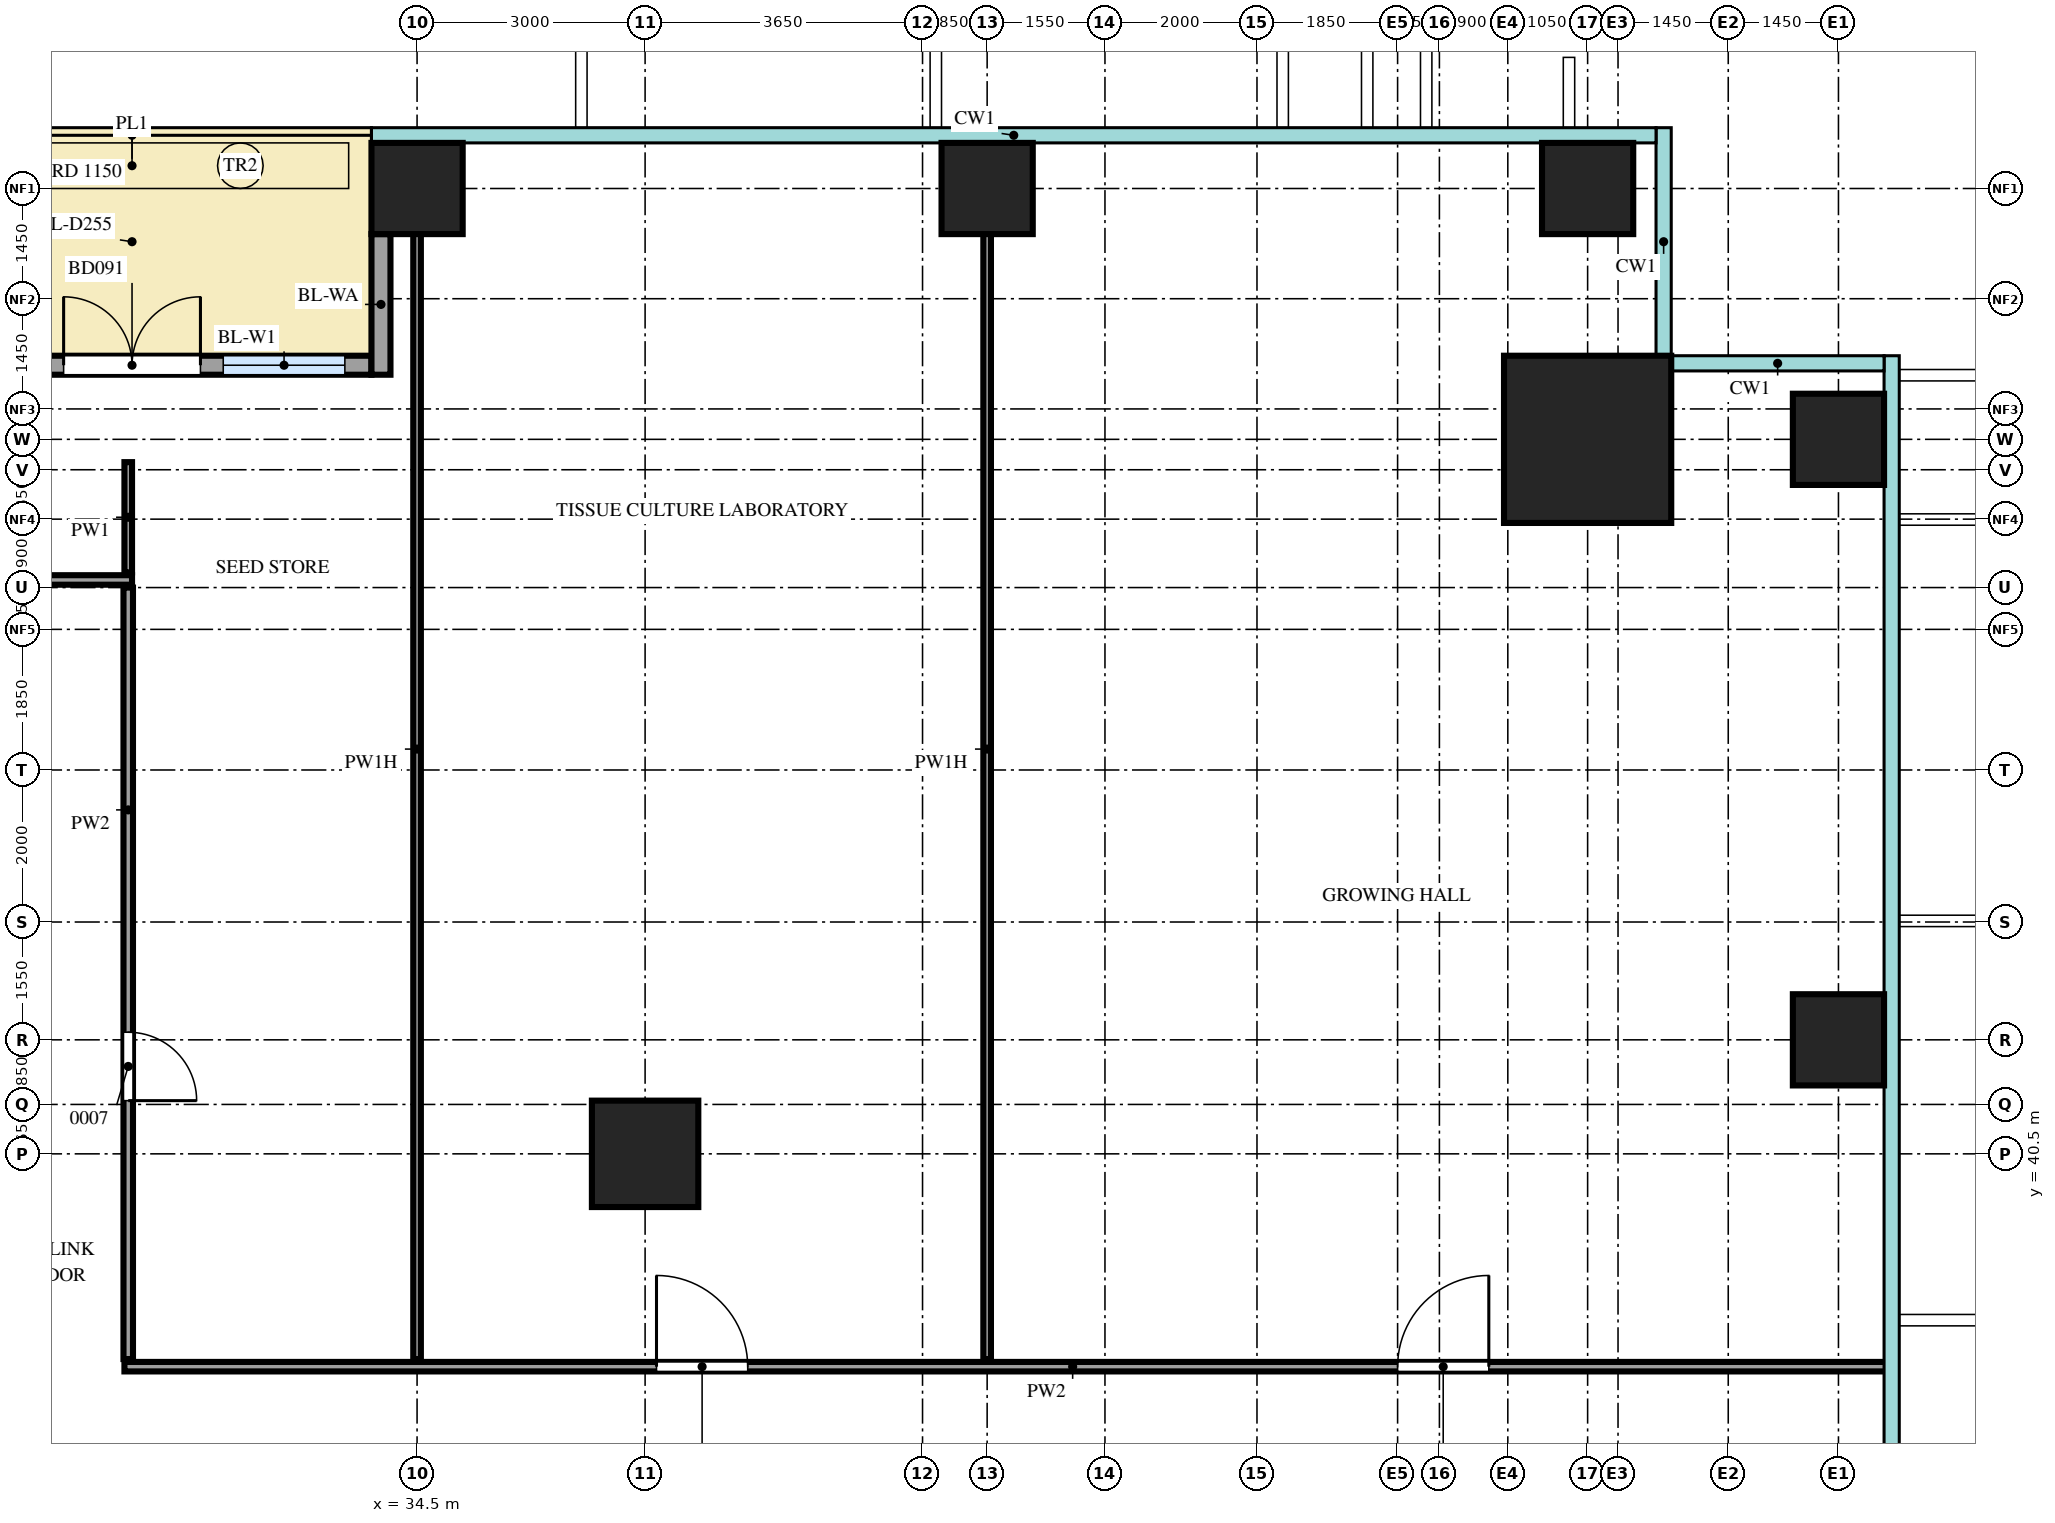
"""IFC4 building model, lengths in metres.
Left out: names, types, materials, properties, quantities, classifications, styles, units other than length and angle.
Written with IfcOpenShell. Run it as: python <this file> out.ifc"""

import sys

from ifc_helpers import new_model, si_unit, direction, frame, frame_2d, origin, origin_2d, place, context, subcontext, project, spatial, rectangle, extrude, source, transform, mapped, element, fill, save


model = new_model("IFC4")
c1 = context("Model", 3, precision=1e-05, world=origin(), true_north=direction((0.0, 1.0)))
c2 = subcontext(c1, "Body", "Model", "MODEL_VIEW")
j1 = project(units=[si_unit("LENGTHUNIT", "METRE"), si_unit("PLANEANGLEUNIT", "RADIAN")], contexts=[c1])
p1 = place(None, origin())
s1 = spatial("IfcSite", under=j1, at=p1, CompositionType="ELEMENT")
p2 = place(p1, origin())
s2 = spatial("IfcBuilding", under=s1, at=p2, CompositionType="ELEMENT")
p3 = place(p2, frame((0.0, 0.0, 46.5)))
s3 = spatial("IfcBuildingStorey", under=s2, at=p3, CompositionType="ELEMENT", Elevation=46.5)
m1 = source(origin(), c2, "Body", "SweptSolid", [
    extrude(rectangle(XDim=2.2, YDim=2.2, at=origin_2d()), origin(), (0.0, 0.0, 1.0), 4.5),
])
p4 = place(p3, frame((49.9, 49.9, 0.0), z_axis=(0.0, 0.0, 1.0), x_axis=(1.0, 0.0, 0.0)))
e1 = element("IfcColumn", 1, at=p4, inside=s3, PredefinedType="COLUMN", context=c2, shape_type="MappedRepresentation", body=[
    mapped(m1, transform((0.0, 0.0, 0.0))),
])
m2 = source(origin(), c2, "Body", "SweptSolid", [
    extrude(rectangle(XDim=1.2, YDim=1.2, at=origin_2d()), origin(), (0.0, 0.0, 1.0), 4.2),
])
for number, where, z_axis, x_axis in (
    (2, (53.2, 42.0, 0.0), (0.0, 0.0, 1.0), (1.0, 0.0, 0.0)),
    (3, (53.2, 49.9, 0.0), (0.0, 0.0, 1.0), (1.0, 0.0, 0.0)),
    (4, (34.5, 53.2, 0.0), (0.0, 0.0, 1.0), (1.0, 0.0, 0.0)),
    (5, (42.0, 53.2, 0.0), (0.0, 0.0, 1.0), (1.0, 0.0, 0.0)),
    (6, (49.9, 53.2, 0.0), (0.0, 0.0, 1.0), (1.0, 0.0, 0.0)),
):
    element("IfcColumn", number, at=place(p3, frame(where, z_axis=z_axis, x_axis=x_axis)), inside=s3, PredefinedType="COLUMN", context=c2, shape_type="MappedRepresentation", body=[
        mapped(m2, transform((0.0, 0.0, 0.0))),
    ])
m3 = source(origin(), c2, "Body", "SweptSolid", [
    extrude(rectangle(XDim=1.4, YDim=1.4, at=origin_2d()), origin(), (0.0, 0.0, 1.0), 4.2),
])
p5 = place(p3, frame((37.5, 40.5, 0.0), z_axis=(0.0, 0.0, 1.0), x_axis=(1.0, 0.0, 0.0)))
e7 = element("IfcColumn", 7, at=p5, inside=s3, PredefinedType="COLUMN", context=c2, shape_type="MappedRepresentation", body=[
    mapped(m3, transform((0.0, 0.0, 0.0))),
])
m4 = source(origin(), c2, "Body", "SweptSolid", [
    extrude(rectangle(XDim=6.3, YDim=0.25, at=frame_2d((3.15, 0.0))), origin(), (0.0, 0.0, 1.0), 4.2),
])
p6 = place(p3, frame((27.6, 50.875, 0.0), z_axis=(0.0, 0.0, 1.0), x_axis=(1.0, 0.0, 0.0)))
e8 = element("IfcWall", 8, at=p6, inside=s3, PredefinedType="SOLIDWALL", context=c2, shape_type="MappedRepresentation", body=[
    mapped(m4, transform((0.0, 0.0, 0.0))),
])
m5 = source(origin(), c2, "Body", "SweptSolid", [
    extrude(rectangle(XDim=1.6, YDim=2.4, at=frame_2d((0.8, 1.2))), frame((0.0, 0.135, 0.0), z_axis=(0.0, -1.0, 0.0), x_axis=(1.0, 0.0, 0.0)), (0.0, 0.0, 1.0), 0.27),
])
p7 = place(p6, frame((0.35, 0.0, 0.0)))
e9 = element("IfcOpeningElement", 9, at=p7, cuts=e8, PredefinedType="OPENING", context=c2, shape_type="MappedRepresentation", body=[
    mapped(m5, transform((0.0, 0.0, 0.0))),
])
p8 = place(p6, frame((4.35, 0.0, 0.0)))
e10 = element("IfcOpeningElement", 10, at=p8, cuts=e8, PredefinedType="OPENING", context=c2, shape_type="MappedRepresentation", body=[
    mapped(m5, transform((0.0, 0.0, 0.0))),
])
m6 = source(origin(), c2, "Body", "SweptSolid", [
    extrude(rectangle(XDim=1.8, YDim=2.4, at=frame_2d((0.9, 1.2))), frame((0.0, 0.135, 0.0), z_axis=(0.0, -1.0, 0.0), x_axis=(1.0, 0.0, 0.0)), (0.0, 0.0, 1.0), 0.27),
])
p9 = place(p6, frame((2.25, 0.0, 0.0)))
e11 = element("IfcOpeningElement", 11, at=p9, cuts=e8, PredefinedType="OPENING", context=c2, shape_type="MappedRepresentation", body=[
    mapped(m6, transform((0.0, 0.0, 0.0))),
])
m7 = source(origin(), c2, "Body", "SweptSolid", [
    extrude(rectangle(XDim=1.85, YDim=0.25, at=frame_2d((0.925, 0.0))), origin(), (0.0, 0.0, 1.0), 3.9),
])
p10 = place(p3, frame((34.025, 52.6, 0.0), z_axis=(0.0, 0.0, 1.0), x_axis=(0.0, -1.0, 0.0)))
e12 = element("IfcWall", 12, at=p10, inside=s3, PredefinedType="SOLIDWALL", context=c2, shape_type="MappedRepresentation", body=[
    mapped(m7, transform((0.0, 0.0, 0.0))),
])
m8 = source(origin(), c2, "Body", "SweptSolid", [
    extrude(rectangle(XDim=23.2, YDim=0.125, at=frame_2d((11.6, 0.0))), origin(), (0.0, 0.0, 1.0), 4.3),
])
p11 = place(p3, frame((30.65, 37.7, 0.0), z_axis=(0.0, 0.0, 1.0), x_axis=(1.0, 0.0, 0.0)))
e13 = element("IfcWall", 13, at=p11, inside=s3, PredefinedType="PARTITIONING", context=c2, shape_type="MappedRepresentation", body=[
    mapped(m8, transform((0.0, 0.0, 0.0))),
])
m9 = source(origin(), c2, "Body", "SweptSolid", [
    extrude(rectangle(XDim=1.2, YDim=2.1, at=frame_2d((0.6, 1.05))), frame((0.0, 0.073, 0.0), z_axis=(0.0, -1.0, 0.0), x_axis=(1.0, 0.0, 0.0)), (0.0, 0.0, 1.0), 0.145),
])
p12 = place(p11, frame((7.0, 0.0, 0.0)))
e14 = element("IfcOpeningElement", 14, at=p12, cuts=e13, PredefinedType="OPENING", context=c2, shape_type="MappedRepresentation", body=[
    mapped(m9, transform((0.0, 0.0, 0.0))),
])
p13 = place(p11, frame((16.75, 0.0, 0.0)))
e15 = element("IfcOpeningElement", 15, at=p13, cuts=e13, PredefinedType="OPENING", context=c2, shape_type="MappedRepresentation", body=[
    mapped(m9, transform((0.0, 0.0, 0.0))),
])
m10 = source(origin(), c2, "Body", "SweptSolid", [
    extrude(rectangle(XDim=10.15, YDim=0.125, at=frame_2d((5.075, 0.0))), origin(), (0.0, 0.0, 1.0), 4.3),
])
p14 = place(p3, frame((30.7, 37.8, 0.0), z_axis=(0.0, 0.0, 1.0), x_axis=(0.0, 1.0, 0.0)))
e16 = element("IfcWall", 16, at=p14, inside=s3, PredefinedType="PARTITIONING", context=c2, shape_type="MappedRepresentation", body=[
    mapped(m10, transform((0.0, 0.0, 0.0))),
])
m11 = source(origin(), c2, "Body", "SweptSolid", [
    extrude(rectangle(XDim=0.9, YDim=2.1, at=frame_2d((0.45, 1.05))), frame((0.0, 0.073, 0.0), z_axis=(0.0, -1.0, 0.0), x_axis=(1.0, 0.0, 0.0)), (0.0, 0.0, 1.0), 0.145),
])
p15 = place(p14, frame((3.4, 0.0, 0.0)))
e17 = element("IfcOpeningElement", 17, at=p15, cuts=e16, PredefinedType="OPENING", context=c2, shape_type="MappedRepresentation", body=[
    mapped(m11, transform((0.0, 0.0, 0.0))),
])
m12 = source(origin(), c2, "Body", "SweptSolid", [
    extrude(rectangle(XDim=16.05, YDim=0.1, at=frame_2d((8.025, 0.0))), origin(), (0.0, 0.0, 1.0), 3.7),
])
for number, where, z_axis, x_axis in (
    (18, (34.5, 37.8, 0.0), (0.0, 0.0, 1.0), (0.0, 1.0, 0.0)),
    (19, (42.0, 37.8, 0.0), (0.0, 0.0, 1.0), (0.0, 1.0, 0.0)),
):
    element("IfcWall", number, at=place(p3, frame(where, z_axis=z_axis, x_axis=x_axis)), inside=s3, PredefinedType="PARTITIONING", context=c2, shape_type="MappedRepresentation", body=[
        mapped(m12, transform((0.0, 0.0, 0.0))),
    ])
m13 = source(origin(), c2, "Body", "SweptSolid", [
    extrude(rectangle(XDim=26.6, YDim=0.125, at=frame_2d((13.3, 0.0))), origin(), (0.0, 0.0, 1.0), 4.3),
])
p16 = place(p3, frame((4.15, 48.05, 0.0), z_axis=(0.0, 0.0, 1.0), x_axis=(1.0, 0.0, 0.0)))
e20 = element("IfcWall", 20, at=p16, inside=s3, PredefinedType="PARTITIONING", context=c2, shape_type="MappedRepresentation", body=[
    mapped(m13, transform((0.0, 0.0, 0.0))),
])
p17 = place(p16, frame((3.5, 0.0, 0.0)))
e21 = element("IfcOpeningElement", 21, at=p17, cuts=e20, PredefinedType="OPENING", context=c2, shape_type="MappedRepresentation", body=[
    mapped(m11, transform((0.0, 0.0, 0.0))),
])
p18 = place(p16, frame((16.6, 0.0, 0.0)))
e22 = element("IfcOpeningElement", 22, at=p18, cuts=e20, PredefinedType="OPENING", context=c2, shape_type="MappedRepresentation", body=[
    mapped(m9, transform((0.0, 0.0, 0.0))),
])
m14 = source(origin(), c2, "Body", "SweptSolid", [
    extrude(rectangle(XDim=1.45, YDim=0.1, at=frame_2d((0.725, 0.0))), origin(), (0.0, 0.0, 1.0), 4.3),
])
p19 = place(p3, frame((30.7, 48.15, 0.0), z_axis=(0.0, 0.0, 1.0), x_axis=(0.0, 1.0, 0.0)))
e23 = element("IfcWall", 23, at=p19, inside=s3, PredefinedType="PARTITIONING", context=c2, shape_type="MappedRepresentation", body=[
    mapped(m14, transform((0.0, 0.0, 0.0))),
])
m15 = source(origin(), c2, "Body", "SweptSolid", [
    extrude(rectangle(XDim=1.6, YDim=2.4, at=frame_2d((0.8, 1.2))), frame((0.0, 0.03, 0.0), z_axis=(0.0, -1.0, 0.0), x_axis=(1.0, 0.0, 0.0)), (0.0, 0.0, 1.0), 0.06),
])
p20 = place(p8, origin())
e24 = element("IfcWindow", 24, at=p20, inside=s3, PartitioningType="SINGLE_PANEL", PredefinedType="WINDOW", context=c2, shape_type="MappedRepresentation", body=[
    mapped(m15, transform((0.0, 0.0, 0.0))),
])
fill(e10, e24)
m16 = source(origin(), c2, "Body", "SweptSolid", [
    extrude(rectangle(XDim=1.8, YDim=2.4, at=frame_2d((0.9, 1.2))), frame((0.0, 0.025, 0.0), z_axis=(0.0, -1.0, 0.0), x_axis=(1.0, 0.0, 0.0)), (0.0, 0.0, 1.0), 0.05),
])
p21 = place(p9, origin())
e25 = element("IfcDoor", 25, at=p21, inside=s3, OperationType="DOUBLE_DOOR_DOUBLE_SWING", PredefinedType="DOOR", context=c2, shape_type="MappedRepresentation", body=[
    mapped(m16, transform((0.0, 0.0, 0.0))),
])
fill(e11, e25)
m17 = source(origin(), c2, "Body", "SweptSolid", [
    extrude(rectangle(XDim=0.9, YDim=2.1, at=frame_2d((0.45, 1.05))), frame((0.0, 0.025, 0.0), z_axis=(0.0, -1.0, 0.0), x_axis=(1.0, 0.0, 0.0)), (0.0, 0.0, 1.0), 0.05),
])
p22 = place(p15, origin())
e26 = element("IfcDoor", 26, at=p22, inside=s3, OperationType="SINGLE_SWING_LEFT", PredefinedType="DOOR", context=c2, shape_type="MappedRepresentation", body=[
    mapped(m17, transform((0.0, 0.0, 0.0))),
])
fill(e17, e26)
m18 = source(origin(), c2, "Body", "SweptSolid", [
    extrude(rectangle(XDim=1.2, YDim=2.1, at=frame_2d((0.6, 1.05))), frame((0.0, 0.025, 0.0), z_axis=(0.0, -1.0, 0.0), x_axis=(1.0, 0.0, 0.0)), (0.0, 0.0, 1.0), 0.05),
])
p23 = place(p12, origin())
e27 = element("IfcDoor", 27, at=p23, inside=s3, OperationType="SINGLE_SWING_RIGHT", PredefinedType="DOOR", context=c2, shape_type="MappedRepresentation", body=[
    mapped(m18, transform((0.0, 0.0, 0.0))),
])
fill(e14, e27)
p24 = place(p13, origin())
e28 = element("IfcDoor", 28, at=p24, inside=s3, OperationType="SINGLE_SWING_LEFT", PredefinedType="DOOR", context=c2, shape_type="MappedRepresentation", body=[
    mapped(m18, transform((0.0, 0.0, 0.0))),
])
fill(e15, e28)
save(model, sys.argv[1])
